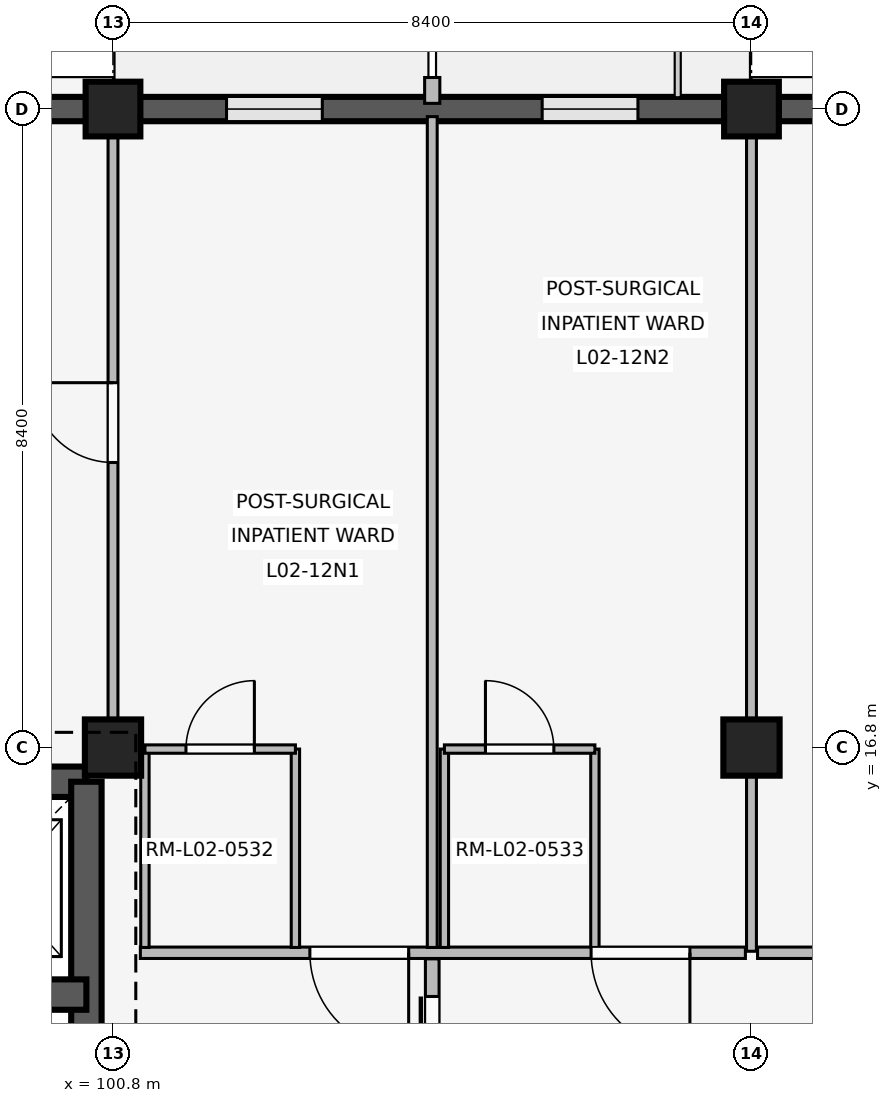
"""IFC4 building model, lengths in metres.
Left out: names, types, materials, properties, quantities, classifications, styles, units other than length and angle.
Written with IfcOpenShell. Run it as: python <this file> out.ifc"""

import sys

from ifc_helpers import new_model, si_unit, direction, frame, frame_2d, origin, origin_2d, place, context, subcontext, project, spatial, rectangle, extrude, element, fill, save


model = new_model("IFC4")
c1 = context("Model", 3, precision=1e-05, world=origin(), true_north=direction((0.0, 1.0)))
c2 = subcontext(c1, "Body", "Model", "MODEL_VIEW")
j1 = project(units=[si_unit("LENGTHUNIT", "METRE"), si_unit("PLANEANGLEUNIT", "RADIAN")], contexts=[c1])
p1 = place(None, origin())
s1 = spatial("IfcSite", under=j1, at=p1, CompositionType="ELEMENT")
p2 = place(p1, origin())
s2 = spatial("IfcBuilding", under=s1, at=p2, CompositionType="ELEMENT")
p3 = place(p2, frame((0.0, 0.0, 8.1)))
s3 = spatial("IfcBuildingStorey", under=s2, at=p3, CompositionType="ELEMENT", Elevation=8.1)
p4 = place(p3, frame((100.8, 16.8, 0.0), z_axis=(0.0, 0.0, 1.0), x_axis=(1.0, 0.0, 0.0)))
e1 = element("IfcColumn", 1, at=p4, inside=s3, PredefinedType="COLUMN", context=c2, shape_type="SweptSolid", body=[
    extrude(rectangle(XDim=0.74, YDim=0.74, at=origin_2d()), origin(), (0.0, 0.0, 1.0), 4.8),
])
p5 = place(p3, frame((100.8, 25.2, 0.0), z_axis=(0.0, 0.0, 1.0), x_axis=(1.0, 0.0, 0.0)))
e2 = element("IfcColumn", 2, at=p5, inside=s3, PredefinedType="COLUMN", context=c2, shape_type="SweptSolid", body=[
    extrude(rectangle(XDim=0.72, YDim=0.72, at=origin_2d()), origin(), (0.0, 0.0, 1.0), 4.8),
])
p6 = place(p3, frame((109.2, 16.8, 0.0), z_axis=(0.0, 0.0, 1.0), x_axis=(1.0, 0.0, 0.0)))
e3 = element("IfcColumn", 3, at=p6, inside=s3, PredefinedType="COLUMN", context=c2, shape_type="SweptSolid", body=[
    extrude(rectangle(XDim=0.74, YDim=0.74, at=origin_2d()), origin(), (0.0, 0.0, 1.0), 4.8),
])
p7 = place(p3, frame((109.2, 25.2, 0.0), z_axis=(0.0, 0.0, 1.0), x_axis=(1.0, 0.0, 0.0)))
e4 = element("IfcColumn", 4, at=p7, inside=s3, PredefinedType="COLUMN", context=c2, shape_type="SweptSolid", body=[
    extrude(rectangle(XDim=0.72, YDim=0.72, at=origin_2d()), origin(), (0.0, 0.0, 1.0), 4.8),
])
p8 = place(p3, frame((92.755, 25.2, 0.0), z_axis=(0.0, 0.0, 1.0), x_axis=(1.0, 0.0, 0.0)))
e5 = element("IfcWall", 5, at=p8, inside=s3, PredefinedType="SOLIDWALL", context=c2, shape_type="SweptSolid", body=[
    extrude(rectangle(XDim=7.69, YDim=0.32, at=frame_2d((3.845, 0.0))), origin(), (0.0, 0.0, 1.0), 3.86),
])
p9 = place(p8, frame((1.109, 0.0, 0.85)))
e6 = element("IfcOpeningElement", 6, at=p9, cuts=e5, PredefinedType="OPENING", context=c2, shape_type="SweptSolid", body=[
    extrude(rectangle(XDim=1.32, YDim=1.58, at=frame_2d((0.66, 0.79))), frame((0.0, 0.17, 0.0), z_axis=(0.0, -1.0, 0.0), x_axis=(1.0, 0.0, 0.0)), (0.0, 0.0, 1.0), 0.34),
])
p10 = place(p8, frame((5.261, 0.0, 0.85)))
e7 = element("IfcOpeningElement", 7, at=p10, cuts=e5, PredefinedType="OPENING", context=c2, shape_type="SweptSolid", body=[
    extrude(rectangle(XDim=1.32, YDim=1.58, at=frame_2d((0.66, 0.79))), frame((0.0, 0.17, 0.0), z_axis=(0.0, -1.0, 0.0), x_axis=(1.0, 0.0, 0.0)), (0.0, 0.0, 1.0), 0.34),
])
p11 = place(p3, frame((101.155, 25.2, 0.0), z_axis=(0.0, 0.0, 1.0), x_axis=(1.0, 0.0, 0.0)))
e8 = element("IfcWall", 8, at=p11, inside=s3, PredefinedType="SOLIDWALL", context=c2, shape_type="SweptSolid", body=[
    extrude(rectangle(XDim=7.69, YDim=0.32, at=frame_2d((3.845, 0.0))), origin(), (0.0, 0.0, 1.0), 3.86),
])
p12 = place(p11, frame((1.139, 0.0, 0.85)))
e9 = element("IfcOpeningElement", 9, at=p12, cuts=e8, PredefinedType="OPENING", context=c2, shape_type="SweptSolid", body=[
    extrude(rectangle(XDim=1.26, YDim=1.52, at=frame_2d((0.63, 0.76))), frame((0.0, 0.17, 0.0), z_axis=(0.0, -1.0, 0.0), x_axis=(1.0, 0.0, 0.0)), (0.0, 0.0, 1.0), 0.34),
])
p13 = place(p11, frame((5.291, 0.0, 0.85)))
e10 = element("IfcOpeningElement", 10, at=p13, cuts=e8, PredefinedType="OPENING", context=c2, shape_type="SweptSolid", body=[
    extrude(rectangle(XDim=1.26, YDim=1.52, at=frame_2d((0.63, 0.76))), frame((0.0, 0.17, 0.0), z_axis=(0.0, -1.0, 0.0), x_axis=(1.0, 0.0, 0.0)), (0.0, 0.0, 1.0), 0.34),
])
p14 = place(p3, frame((105.0, 25.275, 0.0), z_axis=(0.0, 0.0, 1.0), x_axis=(0.0, 1.0, 0.0)))
e11 = element("IfcWall", 11, at=p14, inside=s3, PredefinedType="ELEMENTEDWALL", context=c2, shape_type="SweptSolid", body=[
    extrude(rectangle(XDim=0.34, YDim=0.2, at=frame_2d((0.17, 0.0))), origin(), (0.0, 0.0, 1.0), 3.84),
])
p15 = place(p3, frame((109.555, 25.2, 0.0), z_axis=(0.0, 0.0, 1.0), x_axis=(1.0, 0.0, 0.0)))
e12 = element("IfcWall", 12, at=p15, inside=s3, PredefinedType="SOLIDWALL", context=c2, shape_type="SweptSolid", body=[
    extrude(rectangle(XDim=7.69, YDim=0.32, at=frame_2d((3.845, 0.0))), origin(), (0.0, 0.0, 1.0), 3.86),
])
p16 = place(p15, frame((1.189, 0.0, 0.85)))
e13 = element("IfcOpeningElement", 13, at=p16, cuts=e12, PredefinedType="OPENING", context=c2, shape_type="SweptSolid", body=[
    extrude(rectangle(XDim=1.16, YDim=1.48, at=frame_2d((0.58, 0.74))), frame((0.0, 0.17, 0.0), z_axis=(0.0, -1.0, 0.0), x_axis=(1.0, 0.0, 0.0)), (0.0, 0.0, 1.0), 0.34),
])
p17 = place(p15, frame((5.341, 0.0, 0.85)))
e14 = element("IfcOpeningElement", 14, at=p17, cuts=e12, PredefinedType="OPENING", context=c2, shape_type="SweptSolid", body=[
    extrude(rectangle(XDim=1.16, YDim=1.48, at=frame_2d((0.58, 0.74))), frame((0.0, 0.17, 0.0), z_axis=(0.0, -1.0, 0.0), x_axis=(1.0, 0.0, 0.0)), (0.0, 0.0, 1.0), 0.34),
])
p18 = place(p3, frame((92.95, 16.35, 0.0), z_axis=(0.0, 0.0, 1.0), x_axis=(1.0, 0.0, 0.0)))
e15 = element("IfcWall", 15, at=p18, inside=s3, PredefinedType="SHEAR", context=c2, shape_type="SweptSolid", body=[
    extrude(rectangle(XDim=7.5, YDim=0.4, at=frame_2d((3.75, 0.0))), origin(), (0.0, 0.0, 1.0), 4.52),
])
p19 = place(p3, frame((100.45, 8.8, 0.0), z_axis=(0.0, 0.0, 1.0), x_axis=(0.0, 1.0, 0.0)))
e16 = element("IfcWall", 16, at=p19, inside=s3, PredefinedType="SHEAR", context=c2, shape_type="SweptSolid", body=[
    extrude(rectangle(XDim=7.55, YDim=0.4, at=frame_2d((3.775, 0.0))), origin(), (0.0, 0.0, 1.0), 4.52),
])
p20 = place(p19, frame((2.4, 0.0, 0.0)))
e17 = element("IfcOpeningElement", 17, at=p20, cuts=e16, PredefinedType="OPENING", context=c2, shape_type="SweptSolid", body=[
    extrude(rectangle(XDim=1.2, YDim=2.2, at=frame_2d((0.6, 1.1))), frame((0.0, 0.21, 0.0), z_axis=(0.0, -1.0, 0.0), x_axis=(1.0, 0.0, 0.0)), (0.0, 0.0, 1.0), 0.42),
])
p21 = place(p3, frame((96.65, 13.55, 0.0), z_axis=(0.0, 0.0, 1.0), x_axis=(1.0, 0.0, 0.0)))
e18 = element("IfcWall", 18, at=p21, inside=s3, PredefinedType="SHEAR", context=c2, shape_type="SweptSolid", body=[
    extrude(rectangle(XDim=3.8, YDim=0.4, at=frame_2d((1.9, 0.0))), origin(), (0.0, 0.0, 1.0), 4.52),
])
p22 = place(p21, frame((0.32, 0.0, 0.0)))
e19 = element("IfcOpeningElement", 19, at=p22, cuts=e18, PredefinedType="OPENING", context=c2, shape_type="SweptSolid", body=[
    extrude(rectangle(XDim=1.4, YDim=2.25, at=frame_2d((0.7, 1.125))), frame((0.0, 0.21, 0.0), z_axis=(0.0, -1.0, 0.0), x_axis=(1.0, 0.0, 0.0)), (0.0, 0.0, 1.0), 0.42),
])
p23 = place(p21, frame((2.04, 0.0, 0.0)))
e20 = element("IfcOpeningElement", 20, at=p23, cuts=e18, PredefinedType="OPENING", context=c2, shape_type="SweptSolid", body=[
    extrude(rectangle(XDim=1.1, YDim=2.15, at=frame_2d((0.55, 1.075))), frame((0.0, 0.21, 0.0), z_axis=(0.0, -1.0, 0.0), x_axis=(1.0, 0.0, 0.0)), (0.0, 0.0, 1.0), 0.42),
])
p24 = place(p3, frame((100.8, 17.15, 0.0), z_axis=(0.0, 0.0, 1.0), x_axis=(0.0, 1.0, 0.0)))
e21 = element("IfcWall", 21, at=p24, inside=s3, PredefinedType="PARTITIONING", context=c2, shape_type="SweptSolid", body=[
    extrude(rectangle(XDim=7.91, YDim=0.13, at=frame_2d((3.955, 0.0))), origin(), (0.0, 0.0, 1.0), 3.84),
])
p25 = place(p24, frame((3.4, 0.0, 0.0)))
e22 = element("IfcOpeningElement", 22, at=p25, cuts=e21, PredefinedType="OPENING", context=c2, shape_type="SweptSolid", body=[
    extrude(rectangle(XDim=1.05, YDim=2.2, at=frame_2d((0.525, 1.1))), frame((0.0, 0.075, 0.0), z_axis=(0.0, -1.0, 0.0), x_axis=(1.0, 0.0, 0.0)), (0.0, 0.0, 1.0), 0.15),
])
p26 = place(p3, frame((109.12, 14.1, 0.0), z_axis=(0.0, 0.0, 1.0), x_axis=(-1.0, 0.0, 0.0)))
e23 = element("IfcWall", 23, at=p26, inside=s3, PredefinedType="PARTITIONING", context=c2, shape_type="SweptSolid", body=[
    extrude(rectangle(XDim=7.96, YDim=0.15, at=frame_2d((3.98, 0.0))), origin(), (0.0, 0.0, 1.0), 3.84),
])
p27 = place(p26, frame((0.73, 0.0, 0.0)))
e24 = element("IfcOpeningElement", 24, at=p27, cuts=e23, PredefinedType="OPENING", context=c2, shape_type="SweptSolid", body=[
    extrude(rectangle(XDim=1.3, YDim=2.25, at=frame_2d((0.65, 1.125))), frame((0.0, 0.085, 0.0), z_axis=(0.0, -1.0, 0.0), x_axis=(1.0, 0.0, 0.0)), (0.0, 0.0, 1.0), 0.17),
])
p28 = place(p26, frame((4.43, 0.0, 0.0)))
e25 = element("IfcOpeningElement", 25, at=p28, cuts=e23, PredefinedType="OPENING", context=c2, shape_type="SweptSolid", body=[
    extrude(rectangle(XDim=1.3, YDim=2.25, at=frame_2d((0.65, 1.125))), frame((0.0, 0.085, 0.0), z_axis=(0.0, -1.0, 0.0), x_axis=(1.0, 0.0, 0.0)), (0.0, 0.0, 1.0), 0.17),
])
p29 = place(p3, frame((105.0, 14.17, 0.0), z_axis=(0.0, 0.0, 1.0), x_axis=(0.0, 1.0, 0.0)))
e26 = element("IfcWall", 26, at=p29, inside=s3, PredefinedType="PARTITIONING", context=c2, shape_type="SweptSolid", body=[
    extrude(rectangle(XDim=10.93, YDim=0.13, at=frame_2d((5.465, 0.0))), origin(), (0.0, 0.0, 1.0), 3.84),
])
for number, where, z_axis, x_axis in (
    (27, (101.22, 14.17, 0.0), (0.0, 0.0, 1.0), (0.0, 1.0, 0.0)),
    (28, (103.2, 14.17, 0.0), (0.0, 0.0, 1.0), (0.0, 1.0, 0.0)),
):
    element("IfcWall", number, at=place(p3, frame(where, z_axis=z_axis, x_axis=x_axis)), inside=s3, PredefinedType="PARTITIONING", context=c2, shape_type="SweptSolid", body=[
        extrude(rectangle(XDim=2.61, YDim=0.11, at=frame_2d((1.305, 0.0))), origin(), (0.0, 0.0, 1.0), 3.84),
    ])
p30 = place(p3, frame((101.22, 16.78, 0.0), z_axis=(0.0, 0.0, 1.0), x_axis=(1.0, 0.0, 0.0)))
e29 = element("IfcWall", 29, at=p30, inside=s3, PredefinedType="PARTITIONING", context=c2, shape_type="SweptSolid", body=[
    extrude(rectangle(XDim=1.98, YDim=0.11, at=frame_2d((0.99, 0.0))), origin(), (0.0, 0.0, 1.0), 3.84),
])
p31 = place(p30, frame((0.54, 0.0, 0.0)))
e30 = element("IfcOpeningElement", 30, at=p31, cuts=e29, PredefinedType="OPENING", context=c2, shape_type="SweptSolid", body=[
    extrude(rectangle(XDim=0.9, YDim=2.1, at=frame_2d((0.45, 1.05))), frame((0.0, 0.065, 0.0), z_axis=(0.0, -1.0, 0.0), x_axis=(1.0, 0.0, 0.0)), (0.0, 0.0, 1.0), 0.13),
])
for number, where, z_axis, x_axis in (
    (31, (105.16, 14.17, 0.0), (0.0, 0.0, 1.0), (0.0, 1.0, 0.0)),
    (32, (107.14, 14.17, 0.0), (0.0, 0.0, 1.0), (0.0, 1.0, 0.0)),
):
    element("IfcWall", number, at=place(p3, frame(where, z_axis=z_axis, x_axis=x_axis)), inside=s3, PredefinedType="PARTITIONING", context=c2, shape_type="SweptSolid", body=[
        extrude(rectangle(XDim=2.61, YDim=0.11, at=frame_2d((1.305, 0.0))), origin(), (0.0, 0.0, 1.0), 3.84),
    ])
p32 = place(p3, frame((105.16, 16.78, 0.0), z_axis=(0.0, 0.0, 1.0), x_axis=(1.0, 0.0, 0.0)))
e33 = element("IfcWall", 33, at=p32, inside=s3, PredefinedType="PARTITIONING", context=c2, shape_type="SweptSolid", body=[
    extrude(rectangle(XDim=1.98, YDim=0.11, at=frame_2d((0.99, 0.0))), origin(), (0.0, 0.0, 1.0), 3.84),
])
p33 = place(p32, frame((0.54, 0.0, 0.0)))
e34 = element("IfcOpeningElement", 34, at=p33, cuts=e33, PredefinedType="OPENING", context=c2, shape_type="SweptSolid", body=[
    extrude(rectangle(XDim=0.9, YDim=2.1, at=frame_2d((0.45, 1.05))), frame((0.0, 0.065, 0.0), z_axis=(0.0, -1.0, 0.0), x_axis=(1.0, 0.0, 0.0)), (0.0, 0.0, 1.0), 0.13),
])
p34 = place(p3, frame((105.0, 11.18, 0.0), z_axis=(0.0, 0.0, 1.0), x_axis=(0.0, 1.0, 0.0)))
e35 = element("IfcWall", 35, at=p34, inside=s3, PredefinedType="PARTITIONING", context=c2, shape_type="SweptSolid", body=[
    extrude(rectangle(XDim=2.84, YDim=0.18, at=frame_2d((1.42, 0.0))), origin(), (0.0, 0.0, 1.0), 3.84),
])
p35 = place(p34, frame((0.495, 0.0, 0.0)))
e36 = element("IfcOpeningElement", 36, at=p35, cuts=e35, PredefinedType="OPENING", context=c2, shape_type="SweptSolid", body=[
    extrude(rectangle(XDim=1.85, YDim=2.3, at=frame_2d((0.925, 1.15))), frame((0.0, 0.1, 0.0), z_axis=(0.0, -1.0, 0.0), x_axis=(1.0, 0.0, 0.0)), (0.0, 0.0, 1.0), 0.2),
])
p36 = place(p3, frame((109.2, 14.12, 0.0), z_axis=(0.0, 0.0, 1.0), x_axis=(0.0, 1.0, 0.0)))
e37 = element("IfcWall", 37, at=p36, inside=s3, PredefinedType="PARTITIONING", context=c2, shape_type="SweptSolid", body=[
    extrude(rectangle(XDim=10.94, YDim=0.13, at=frame_2d((5.47, 0.0))), origin(), (0.0, 0.0, 1.0), 3.84),
])
p37 = place(p3, frame((117.52, 14.1, 0.0), z_axis=(0.0, 0.0, 1.0), x_axis=(-1.0, 0.0, 0.0)))
e38 = element("IfcWall", 38, at=p37, inside=s3, PredefinedType="PARTITIONING", context=c2, shape_type="SweptSolid", body=[
    extrude(rectangle(XDim=8.24, YDim=0.15, at=frame_2d((4.12, 0.0))), origin(), (0.0, 0.0, 1.0), 3.84),
])
p38 = place(p37, frame((3.37, 0.0, 0.0)))
e39 = element("IfcOpeningElement", 39, at=p38, cuts=e38, PredefinedType="OPENING", context=c2, shape_type="SweptSolid", body=[
    extrude(rectangle(XDim=1.5, YDim=2.3, at=frame_2d((0.75, 1.15))), frame((0.0, 0.085, 0.0), z_axis=(0.0, -1.0, 0.0), x_axis=(1.0, 0.0, 0.0)), (0.0, 0.0, 1.0), 0.17),
])
p39 = place(p12, origin())
e40 = element("IfcWindow", 40, at=p39, inside=s3, PartitioningType="SINGLE_PANEL", PredefinedType="WINDOW", context=c2, shape_type="SweptSolid", body=[
    extrude(rectangle(XDim=1.26, YDim=1.52, at=frame_2d((0.63, 0.76))), frame((0.0, 0.03, 0.0), z_axis=(0.0, -1.0, 0.0), x_axis=(1.0, 0.0, 0.0)), (0.0, 0.0, 1.0), 0.06),
])
fill(e9, e40)
p40 = place(p13, origin())
e41 = element("IfcWindow", 41, at=p40, inside=s3, PartitioningType="SINGLE_PANEL", PredefinedType="WINDOW", context=c2, shape_type="SweptSolid", body=[
    extrude(rectangle(XDim=1.26, YDim=1.52, at=frame_2d((0.63, 0.76))), frame((0.0, 0.03, 0.0), z_axis=(0.0, -1.0, 0.0), x_axis=(1.0, 0.0, 0.0)), (0.0, 0.0, 1.0), 0.06),
])
fill(e10, e41)
p41 = place(p25, origin())
e42 = element("IfcDoor", 42, at=p41, inside=s3, OperationType="SINGLE_SWING_RIGHT", PredefinedType="DOOR", context=c2, shape_type="SweptSolid", body=[
    extrude(rectangle(XDim=1.05, YDim=2.2, at=frame_2d((0.525, 1.1))), frame((0.0, 0.025, 0.0), z_axis=(0.0, -1.0, 0.0), x_axis=(1.0, 0.0, 0.0)), (0.0, 0.0, 1.0), 0.05),
])
fill(e22, e42)
p42 = place(p27, origin())
e43 = element("IfcDoor", 43, at=p42, inside=s3, OperationType="SINGLE_SWING_LEFT", PredefinedType="DOOR", context=c2, shape_type="SweptSolid", body=[
    extrude(rectangle(XDim=1.3, YDim=2.25, at=frame_2d((0.65, 1.125))), frame((0.0, 0.025, 0.0), z_axis=(0.0, -1.0, 0.0), x_axis=(1.0, 0.0, 0.0)), (0.0, 0.0, 1.0), 0.05),
])
fill(e24, e43)
p43 = place(p28, origin())
e44 = element("IfcDoor", 44, at=p43, inside=s3, OperationType="SINGLE_SWING_LEFT", PredefinedType="DOOR", context=c2, shape_type="SweptSolid", body=[
    extrude(rectangle(XDim=1.3, YDim=2.25, at=frame_2d((0.65, 1.125))), frame((0.0, 0.025, 0.0), z_axis=(0.0, -1.0, 0.0), x_axis=(1.0, 0.0, 0.0)), (0.0, 0.0, 1.0), 0.05),
])
fill(e25, e44)
p44 = place(p31, origin())
e45 = element("IfcDoor", 45, at=p44, inside=s3, OperationType="SINGLE_SWING_RIGHT", PredefinedType="DOOR", context=c2, shape_type="SweptSolid", body=[
    extrude(rectangle(XDim=0.9, YDim=2.1, at=frame_2d((0.45, 1.05))), frame((0.0, 0.025, 0.0), z_axis=(0.0, -1.0, 0.0), x_axis=(1.0, 0.0, 0.0)), (0.0, 0.0, 1.0), 0.05),
])
fill(e30, e45)
p45 = place(p33, origin())
e46 = element("IfcDoor", 46, at=p45, inside=s3, OperationType="SINGLE_SWING_LEFT", PredefinedType="DOOR", context=c2, shape_type="SweptSolid", body=[
    extrude(rectangle(XDim=0.9, YDim=2.1, at=frame_2d((0.45, 1.05))), frame((0.0, 0.025, 0.0), z_axis=(0.0, -1.0, 0.0), x_axis=(1.0, 0.0, 0.0)), (0.0, 0.0, 1.0), 0.05),
])
fill(e34, e46)
p46 = place(p35, origin())
e47 = element("IfcDoor", 47, at=p46, inside=s3, OperationType="SLIDING_TO_LEFT", PredefinedType="DOOR", context=c2, shape_type="SweptSolid", body=[
    extrude(rectangle(XDim=1.85, YDim=2.3, at=frame_2d((0.925, 1.15))), frame((0.0, 0.025, 0.0), z_axis=(0.0, -1.0, 0.0), x_axis=(1.0, 0.0, 0.0)), (0.0, 0.0, 1.0), 0.05),
])
fill(e36, e47)
save(model, sys.argv[1])
